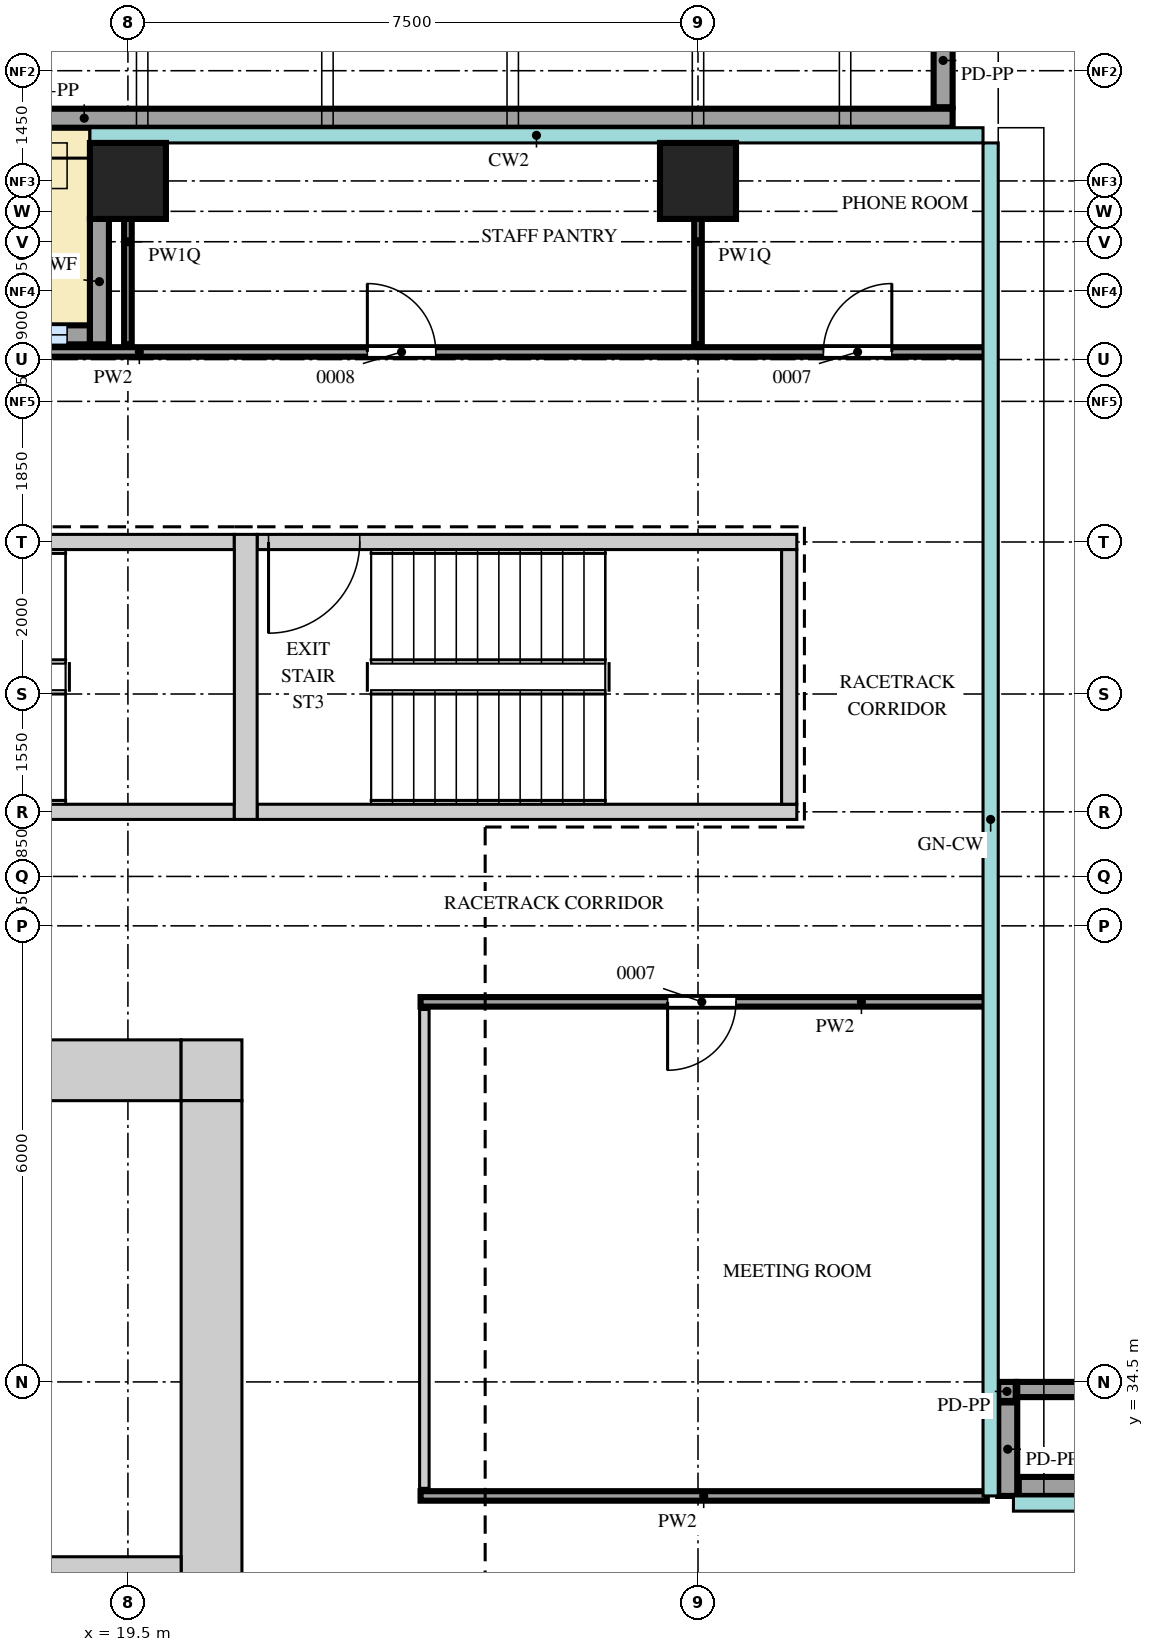
"""IFC4 building model, lengths in metres.
Left out: names, types, materials, properties, quantities, classifications, styles, units other than length and angle.
Written with IfcOpenShell. Run it as: python <this file> out.ifc"""

import sys

from ifc_helpers import new_model, si_unit, direction, frame, frame_2d, origin, origin_2d, place, context, subcontext, project, spatial, rectangle, extrude, source, transform, mapped, element, fill, save


model = new_model("IFC4")
c1 = context("Model", 3, precision=1e-05, world=origin(), true_north=direction((0.0, 1.0)))
c2 = subcontext(c1, "Body", "Model", "MODEL_VIEW")
j1 = project(units=[si_unit("LENGTHUNIT", "METRE"), si_unit("PLANEANGLEUNIT", "RADIAN")], contexts=[c1])
p1 = place(None, origin())
s1 = spatial("IfcSite", under=j1, at=p1, CompositionType="ELEMENT")
p2 = place(p1, origin())
s2 = spatial("IfcBuilding", under=s1, at=p2, CompositionType="ELEMENT")
p3 = place(p2, frame((0.0, 0.0, 164.7)))
s3 = spatial("IfcBuildingStorey", under=s2, at=p3, CompositionType="ELEMENT", Elevation=164.7)
m1 = source(origin(), c2, "Body", "SweptSolid", [
    extrude(rectangle(XDim=13.4, YDim=0.8, at=frame_2d((6.7, 0.0))), origin(), (0.0, 0.0, 1.0), 3.75),
])
p4 = place(p3, frame((6.8, 38.6, 0.0), z_axis=(0.0, 0.0, 1.0), x_axis=(1.0, 0.0, 0.0)))
e1 = element("IfcWall", 1, at=p4, inside=s3, PredefinedType="SHEAR", context=c2, shape_type="MappedRepresentation", body=[
    mapped(m1, transform((0.0, 0.0, 0.0))),
])
m2 = source(origin(), c2, "Body", "SweptSolid", [
    extrude(rectangle(XDim=0.9, YDim=2.1, at=frame_2d((0.45, 1.05))), frame((0.0, 0.41, 0.0), z_axis=(0.0, -1.0, 0.0), x_axis=(1.0, 0.0, 0.0)), (0.0, 0.0, 1.0), 0.82),
])
p5 = place(p4, frame((2.9, 0.0, 0.0)))
e2 = element("IfcOpeningElement", 2, at=p5, cuts=e1, PredefinedType="OPENING", context=c2, shape_type="MappedRepresentation", body=[
    mapped(m2, transform((0.0, 0.0, 0.0))),
])
p6 = place(p4, frame((9.6, 0.0, 0.0)))
e3 = element("IfcOpeningElement", 3, at=p6, cuts=e1, PredefinedType="OPENING", context=c2, shape_type="MappedRepresentation", body=[
    mapped(m2, transform((0.0, 0.0, 0.0))),
])
m3 = source(origin(), c2, "Body", "SweptSolid", [
    extrude(rectangle(XDim=0.8, YDim=0.8, at=frame_2d((0.4, 0.0))), origin(), (0.0, 0.0, 1.0), 3.75),
])
p7 = place(p3, frame((20.2, 38.6, 0.0), z_axis=(0.0, 0.0, 1.0), x_axis=(1.0, 0.0, 0.0)))
e4 = element("IfcWall", 4, at=p7, inside=s3, PredefinedType="SHEAR", context=c2, shape_type="MappedRepresentation", body=[
    mapped(m3, transform((0.0, 0.0, 0.0))),
])
m4 = source(origin(), c2, "Body", "SweptSolid", [
    extrude(rectangle(XDim=22.4, YDim=0.8, at=frame_2d((11.2, 0.0))), origin(), (0.0, 0.0, 1.0), 3.75),
])
p8 = place(p3, frame((20.6, 15.8, 0.0), z_axis=(0.0, 0.0, 1.0), x_axis=(0.0, 1.0, 0.0)))
e5 = element("IfcWall", 5, at=p8, inside=s3, PredefinedType="SHEAR", context=c2, shape_type="MappedRepresentation", body=[
    mapped(m4, transform((0.0, 0.0, 0.0))),
])
m5 = source(origin(), c2, "Body", "SweptSolid", [
    extrude(rectangle(XDim=1.8, YDim=2.1, at=frame_2d((0.9, 1.05))), frame((0.0, 0.41, 0.0), z_axis=(0.0, -1.0, 0.0), x_axis=(1.0, 0.0, 0.0)), (0.0, 0.0, 1.0), 0.82),
])
p9 = place(p8, frame((10.7, 0.0, 0.0)))
e6 = element("IfcOpeningElement", 6, at=p9, cuts=e5, PredefinedType="OPENING", context=c2, shape_type="MappedRepresentation", body=[
    mapped(m5, transform((0.0, 0.0, 0.0))),
])
p10 = place(p8, frame((0.35, 0.0, 0.0)))
e7 = element("IfcOpeningElement", 7, at=p10, cuts=e5, PredefinedType="OPENING", context=c2, shape_type="MappedRepresentation", body=[
    mapped(m2, transform((0.0, 0.0, 0.0))),
])
p11 = place(p8, frame((2.8, 0.0, 0.0)))
e8 = element("IfcOpeningElement", 8, at=p11, cuts=e5, PredefinedType="OPENING", context=c2, shape_type="MappedRepresentation", body=[
    mapped(m2, transform((0.0, 0.0, 0.0))),
])
p12 = place(p8, frame((5.55, 0.0, 0.0)))
e9 = element("IfcOpeningElement", 9, at=p12, cuts=e5, PredefinedType="OPENING", context=c2, shape_type="MappedRepresentation", body=[
    mapped(m2, transform((0.0, 0.0, 0.0))),
])
m6 = source(origin(), c2, "Body", "SweptSolid", [
    extrude(rectangle(XDim=7.0, YDim=0.2, at=frame_2d((3.5, 0.0))), origin(), (0.0, 0.0, 1.0), 3.75),
])
p13 = place(p3, frame((13.9, 45.55, 0.0), z_axis=(0.0, 0.0, 1.0), x_axis=(1.0, 0.0, 0.0)))
e10 = element("IfcWall", 10, at=p13, inside=s3, PredefinedType="SHEAR", context=c2, shape_type="MappedRepresentation", body=[
    mapped(m6, transform((0.0, 0.0, 0.0))),
])
m7 = source(origin(), c2, "Body", "SweptSolid", [
    extrude(rectangle(XDim=1.2, YDim=2.1, at=frame_2d((0.6, 1.05))), frame((0.0, 0.11, 0.0), z_axis=(0.0, -1.0, 0.0), x_axis=(1.0, 0.0, 0.0)), (0.0, 0.0, 1.0), 0.22),
])
p14 = place(p13, frame((0.35, 0.0, 0.0)))
e11 = element("IfcOpeningElement", 11, at=p14, cuts=e10, PredefinedType="OPENING", context=c2, shape_type="MappedRepresentation", body=[
    mapped(m7, transform((0.0, 0.0, 0.0))),
])
p15 = place(p3, frame((13.9, 42.0, 0.0), z_axis=(0.0, 0.0, 1.0), x_axis=(1.0, 0.0, 0.0)))
e12 = element("IfcWall", 12, at=p15, inside=s3, PredefinedType="SHEAR", context=c2, shape_type="MappedRepresentation", body=[
    mapped(m6, transform((0.0, 0.0, 0.0))),
])
m8 = source(origin(), c2, "Body", "SweptSolid", [
    extrude(rectangle(XDim=7.1, YDim=0.2, at=frame_2d((3.55, 0.0))), origin(), (0.0, 0.0, 1.0), 3.75),
])
p16 = place(p3, frame((21.2, 45.55, 0.0), z_axis=(0.0, 0.0, 1.0), x_axis=(1.0, 0.0, 0.0)))
e13 = element("IfcWall", 13, at=p16, inside=s3, PredefinedType="SHEAR", context=c2, shape_type="MappedRepresentation", body=[
    mapped(m8, transform((0.0, 0.0, 0.0))),
])
p17 = place(p16, frame((0.15, 0.0, 0.0)))
e14 = element("IfcOpeningElement", 14, at=p17, cuts=e13, PredefinedType="OPENING", context=c2, shape_type="MappedRepresentation", body=[
    mapped(m7, transform((0.0, 0.0, 0.0))),
])
p18 = place(p3, frame((21.2, 42.0, 0.0), z_axis=(0.0, 0.0, 1.0), x_axis=(1.0, 0.0, 0.0)))
e15 = element("IfcWall", 15, at=p18, inside=s3, PredefinedType="SHEAR", context=c2, shape_type="MappedRepresentation", body=[
    mapped(m8, transform((0.0, 0.0, 0.0))),
])
m9 = source(origin(), c2, "Body", "SweptSolid", [
    extrude(rectangle(XDim=3.75, YDim=0.3, at=frame_2d((1.875, 0.0))), origin(), (0.0, 0.0, 1.0), 3.75),
])
p19 = place(p3, frame((21.05, 41.9, 0.0), z_axis=(0.0, 0.0, 1.0), x_axis=(0.0, 1.0, 0.0)))
e16 = element("IfcWall", 16, at=p19, inside=s3, PredefinedType="SHEAR", context=c2, shape_type="MappedRepresentation", body=[
    mapped(m9, transform((0.0, 0.0, 0.0))),
])
m10 = source(origin(), c2, "Body", "SweptSolid", [
    extrude(rectangle(XDim=3.35, YDim=0.2, at=frame_2d((1.675, 0.0))), origin(), (0.0, 0.0, 1.0), 3.75),
])
p20 = place(p3, frame((28.2, 42.1, 0.0), z_axis=(0.0, 0.0, 1.0), x_axis=(0.0, 1.0, 0.0)))
e17 = element("IfcWall", 17, at=p20, inside=s3, PredefinedType="SHEAR", context=c2, shape_type="MappedRepresentation", body=[
    mapped(m10, transform((0.0, 0.0, 0.0))),
])
m11 = source(origin(), c2, "Body", "SweptSolid", [
    extrude(rectangle(XDim=13.4, YDim=0.3, at=frame_2d((6.7, 0.0))), origin(), (0.0, 0.0, 1.0), 3.75),
])
p21 = place(p3, frame((6.8, 32.05, 0.0), z_axis=(0.0, 0.0, 1.0), x_axis=(1.0, 0.0, 0.0)))
e18 = element("IfcWall", 18, at=p21, inside=s3, PredefinedType="STANDARD", context=c2, shape_type="MappedRepresentation", body=[
    mapped(m11, transform((0.0, 0.0, 0.0))),
])
m12 = source(origin(), c2, "Body", "SweptSolid", [
    extrude(rectangle(XDim=1.0, YDim=1.0, at=origin_2d()), origin(), (0.0, 0.0, 1.0), 3.75),
])
for number, where, z_axis, x_axis in (
    (19, (19.5, 50.3, 0.0), (0.0, 0.0, 1.0), (1.0, 0.0, 0.0)),
    (20, (27.0, 50.3, 0.0), (0.0, 0.0, 1.0), (1.0, 0.0, 0.0)),
):
    element("IfcColumn", number, at=place(p3, frame(where, z_axis=z_axis, x_axis=x_axis)), inside=s3, PredefinedType="COLUMN", context=c2, shape_type="MappedRepresentation", body=[
        mapped(m12, transform((0.0, 0.0, 0.0))),
    ])
m13 = source(origin(), c2, "Body", "SweptSolid", [
    extrude(rectangle(XDim=6.5, YDim=0.25, at=frame_2d((3.25, 0.0))), origin(), (0.0, 0.0, 1.0), 3.75),
])
p22 = place(p3, frame((12.5, 48.275, 0.0), z_axis=(0.0, 0.0, 1.0), x_axis=(1.0, 0.0, 0.0)))
e21 = element("IfcWall", 21, at=p22, inside=s3, PredefinedType="SOLIDWALL", context=c2, shape_type="MappedRepresentation", body=[
    mapped(m13, transform((0.0, 0.0, 0.0))),
])
m14 = source(origin(), c2, "Body", "SweptSolid", [
    extrude(rectangle(XDim=1.75, YDim=2.4, at=frame_2d((0.875, 1.2))), frame((0.0, 0.135, 0.0), z_axis=(0.0, -1.0, 0.0), x_axis=(1.0, 0.0, 0.0)), (0.0, 0.0, 1.0), 0.27),
])
p23 = place(p22, frame((0.3, 0.0, 0.0)))
e22 = element("IfcOpeningElement", 22, at=p23, cuts=e21, PredefinedType="OPENING", context=c2, shape_type="MappedRepresentation", body=[
    mapped(m14, transform((0.0, 0.0, 0.0))),
])
p24 = place(p22, frame((4.45, 0.0, 0.0)))
e23 = element("IfcOpeningElement", 23, at=p24, cuts=e21, PredefinedType="OPENING", context=c2, shape_type="MappedRepresentation", body=[
    mapped(m14, transform((0.0, 0.0, 0.0))),
])
m15 = source(origin(), c2, "Body", "SweptSolid", [
    extrude(rectangle(XDim=1.8, YDim=2.4, at=frame_2d((0.9, 1.2))), frame((0.0, 0.135, 0.0), z_axis=(0.0, -1.0, 0.0), x_axis=(1.0, 0.0, 0.0)), (0.0, 0.0, 1.0), 0.27),
])
p25 = place(p22, frame((2.35, 0.0, 0.0)))
e24 = element("IfcOpeningElement", 24, at=p25, cuts=e21, PredefinedType="OPENING", context=c2, shape_type="MappedRepresentation", body=[
    mapped(m15, transform((0.0, 0.0, 0.0))),
])
m16 = source(origin(), c2, "Body", "SweptSolid", [
    extrude(rectangle(XDim=1.65, YDim=0.25, at=frame_2d((0.825, 0.0))), origin(), (0.0, 0.0, 1.0), 3.45),
])
p26 = place(p3, frame((19.125, 49.8, 0.0), z_axis=(0.0, 0.0, 1.0), x_axis=(0.0, -1.0, 0.0)))
e25 = element("IfcWall", 25, at=p26, inside=s3, PredefinedType="SOLIDWALL", context=c2, shape_type="MappedRepresentation", body=[
    mapped(m16, transform((0.0, 0.0, 0.0))),
])
m17 = source(origin(), c2, "Body", "SweptSolid", [
    extrude(rectangle(XDim=12.6, YDim=0.2, at=frame_2d((6.3, 0.0))), origin(), (0.0, 0.0, 1.0), 1.1),
])
p27 = place(p3, frame((31.2, 34.4, 0.0), z_axis=(0.0, 0.0, 1.0), x_axis=(1.0, 0.0, 0.0)))
e26 = element("IfcWall", 26, at=p27, inside=s3, PredefinedType="SOLIDWALL", context=c2, shape_type="MappedRepresentation", body=[
    mapped(m17, transform((0.0, 0.0, 0.0))),
])
m18 = source(origin(), c2, "Body", "SweptSolid", [
    extrude(rectangle(XDim=0.23, YDim=0.25, at=frame_2d((0.115, 0.0))), origin(), (0.0, 0.0, 1.0), 1.1),
])
p28 = place(p3, frame((31.18, 34.375, 0.0), z_axis=(0.0, 0.0, 1.0), x_axis=(-1.0, 0.0, 0.0)))
e27 = element("IfcWall", 27, at=p28, inside=s3, PredefinedType="SOLIDWALL", context=c2, shape_type="MappedRepresentation", body=[
    mapped(m18, transform((0.0, 0.0, 0.0))),
])
m19 = source(origin(), c2, "Body", "SweptSolid", [
    extrude(rectangle(XDim=1.23, YDim=0.25, at=frame_2d((0.615, 0.0))), origin(), (0.0, 0.0, 1.0), 1.1),
])
p29 = place(p3, frame((31.075, 34.23, 0.0), z_axis=(0.0, 0.0, 1.0), x_axis=(0.0, -1.0, 0.0)))
e28 = element("IfcWall", 28, at=p29, inside=s3, PredefinedType="SOLIDWALL", context=c2, shape_type="MappedRepresentation", body=[
    mapped(m19, transform((0.0, 0.0, 0.0))),
])
m20 = source(origin(), c2, "Body", "SweptSolid", [
    extrude(rectangle(XDim=12.83, YDim=0.25, at=frame_2d((6.415, 0.0))), origin(), (0.0, 0.0, 1.0), 1.1),
])
p30 = place(p3, frame((31.22, 33.125, 0.0), z_axis=(0.0, 0.0, 1.0), x_axis=(1.0, 0.0, 0.0)))
e29 = element("IfcWall", 29, at=p30, inside=s3, PredefinedType="SOLIDWALL", context=c2, shape_type="MappedRepresentation", body=[
    mapped(m20, transform((0.0, 0.0, 0.0))),
])
m21 = source(origin(), c2, "Body", "SweptSolid", [
    extrude(rectangle(XDim=22.85, YDim=0.25, at=frame_2d((11.425, 0.0))), origin(), (0.0, 0.0, 1.0), 1.1),
])
p31 = place(p3, frame((7.5, 51.125, 0.0), z_axis=(0.0, 0.0, 1.0), x_axis=(1.0, 0.0, 0.0)))
e30 = element("IfcWall", 30, at=p31, inside=s3, PredefinedType="SOLIDWALL", context=c2, shape_type="MappedRepresentation", body=[
    mapped(m21, transform((0.0, 0.0, 0.0))),
])
p32 = place(p3, frame((30.225, 51.27, 0.0), z_axis=(0.0, 0.0, 1.0), x_axis=(0.0, 1.0, 0.0)))
e31 = element("IfcWall", 31, at=p32, inside=s3, PredefinedType="SOLIDWALL", context=c2, shape_type="MappedRepresentation", body=[
    mapped(m19, transform((0.0, 0.0, 0.0))),
])
m22 = source(origin(), c2, "Body", "SweptSolid", [
    extrude(rectangle(XDim=7.45, YDim=0.125, at=frame_2d((3.725, 0.0))), origin(), (0.0, 0.0, 1.0), 3.8),
])
p33 = place(p3, frame((23.35, 33.0, 0.0), z_axis=(0.0, 0.0, 1.0), x_axis=(1.0, 0.0, 0.0)))
e32 = element("IfcWall", 32, at=p33, inside=s3, PredefinedType="PARTITIONING", context=c2, shape_type="MappedRepresentation", body=[
    mapped(m22, transform((0.0, 0.0, 0.0))),
])
m23 = source(origin(), c2, "Body", "SweptSolid", [
    extrude(rectangle(XDim=6.3, YDim=0.125, at=frame_2d((3.15, 0.0))), origin(), (0.0, 0.0, 1.0), 3.8),
])
p34 = place(p3, frame((23.4, 33.1, 0.0), z_axis=(0.0, 0.0, 1.0), x_axis=(0.0, 1.0, 0.0)))
e33 = element("IfcWall", 33, at=p34, inside=s3, PredefinedType="PARTITIONING", context=c2, shape_type="MappedRepresentation", body=[
    mapped(m23, transform((0.0, 0.0, 0.0))),
])
p35 = place(p3, frame((23.35, 39.5, 0.0), z_axis=(0.0, 0.0, 1.0), x_axis=(1.0, 0.0, 0.0)))
e34 = element("IfcWall", 34, at=p35, inside=s3, PredefinedType="PARTITIONING", context=c2, shape_type="MappedRepresentation", body=[
    mapped(m22, transform((0.0, 0.0, 0.0))),
])
m24 = source(origin(), c2, "Body", "SweptSolid", [
    extrude(rectangle(XDim=0.9, YDim=2.1, at=frame_2d((0.45, 1.05))), frame((0.0, 0.073, 0.0), z_axis=(0.0, -1.0, 0.0), x_axis=(1.0, 0.0, 0.0)), (0.0, 0.0, 1.0), 0.145),
])
p36 = place(p35, frame((3.25, 0.0, 0.0)))
e35 = element("IfcOpeningElement", 35, at=p36, cuts=e34, PredefinedType="OPENING", context=c2, shape_type="MappedRepresentation", body=[
    mapped(m24, transform((0.0, 0.0, 0.0))),
])
m25 = source(origin(), c2, "Body", "SweptSolid", [
    extrude(rectangle(XDim=23.15, YDim=0.125, at=frame_2d((11.575, 0.0))), origin(), (0.0, 0.0, 1.0), 3.8),
])
p37 = place(p3, frame((7.65, 48.05, 0.0), z_axis=(0.0, 0.0, 1.0), x_axis=(1.0, 0.0, 0.0)))
e36 = element("IfcWall", 36, at=p37, inside=s3, PredefinedType="PARTITIONING", context=c2, shape_type="MappedRepresentation", body=[
    mapped(m25, transform((0.0, 0.0, 0.0))),
])
p38 = place(p37, frame((1.5, 0.0, 0.0)))
e37 = element("IfcOpeningElement", 37, at=p38, cuts=e36, PredefinedType="OPENING", context=c2, shape_type="MappedRepresentation", body=[
    mapped(m24, transform((0.0, 0.0, 0.0))),
])
m26 = source(origin(), c2, "Body", "SweptSolid", [
    extrude(rectangle(XDim=1.8, YDim=2.1, at=frame_2d((0.9, 1.05))), frame((0.0, 0.073, 0.0), z_axis=(0.0, -1.0, 0.0), x_axis=(1.0, 0.0, 0.0)), (0.0, 0.0, 1.0), 0.145),
])
p39 = place(p37, frame((7.2, 0.0, 0.0)))
e38 = element("IfcOpeningElement", 38, at=p39, cuts=e36, PredefinedType="OPENING", context=c2, shape_type="MappedRepresentation", body=[
    mapped(m26, transform((0.0, 0.0, 0.0))),
])
p40 = place(p37, frame((15.0, 0.0, 0.0)))
e39 = element("IfcOpeningElement", 39, at=p40, cuts=e36, PredefinedType="OPENING", context=c2, shape_type="MappedRepresentation", body=[
    mapped(m24, transform((0.0, 0.0, 0.0))),
])
p41 = place(p37, frame((21.0, 0.0, 0.0)))
e40 = element("IfcOpeningElement", 40, at=p41, cuts=e36, PredefinedType="OPENING", context=c2, shape_type="MappedRepresentation", body=[
    mapped(m24, transform((0.0, 0.0, 0.0))),
])
m27 = source(origin(), c2, "Body", "SweptSolid", [
    extrude(rectangle(XDim=2.7, YDim=0.1, at=frame_2d((1.35, 0.0))), origin(), (0.0, 0.0, 1.0), 3.42),
])
for number, where, z_axis, x_axis in (
    (41, (19.5, 48.15, 0.0), (0.0, 0.0, 1.0), (0.0, 1.0, 0.0)),
    (42, (27.0, 48.15, 0.0), (0.0, 0.0, 1.0), (0.0, 1.0, 0.0)),
):
    element("IfcWall", number, at=place(p3, frame(where, z_axis=z_axis, x_axis=x_axis)), inside=s3, PredefinedType="PARTITIONING", context=c2, shape_type="MappedRepresentation", body=[
        mapped(m27, transform((0.0, 0.0, 0.0))),
    ])
m28 = source(origin(), c2, "Body", "SweptSolid", [
    extrude(rectangle(XDim=1.75, YDim=2.4, at=frame_2d((0.875, 1.2))), frame((0.0, 0.03, 0.0), z_axis=(0.0, -1.0, 0.0), x_axis=(1.0, 0.0, 0.0)), (0.0, 0.0, 1.0), 0.06),
])
p42 = place(p24, origin())
e43 = element("IfcWindow", 43, at=p42, inside=s3, PartitioningType="SINGLE_PANEL", PredefinedType="WINDOW", context=c2, shape_type="MappedRepresentation", body=[
    mapped(m28, transform((0.0, 0.0, 0.0))),
])
fill(e23, e43)
m29 = source(origin(), c2, "Body", "SweptSolid", [
    extrude(rectangle(XDim=0.9, YDim=2.1, at=frame_2d((0.45, 1.05))), frame((0.0, 0.025, 0.0), z_axis=(0.0, -1.0, 0.0), x_axis=(1.0, 0.0, 0.0)), (0.0, 0.0, 1.0), 0.05),
])
p43 = place(p36, origin())
e44 = element("IfcDoor", 44, at=p43, inside=s3, OperationType="SINGLE_SWING_LEFT", PredefinedType="DOOR", context=c2, shape_type="MappedRepresentation", body=[
    mapped(m29, transform((0.0, 0.0, 0.0))),
])
fill(e35, e44)
p44 = place(p40, origin())
e45 = element("IfcDoor", 45, at=p44, inside=s3, OperationType="SINGLE_SWING_RIGHT", PredefinedType="DOOR", context=c2, shape_type="MappedRepresentation", body=[
    mapped(m29, transform((0.0, 0.0, 0.0))),
])
fill(e39, e45)
p45 = place(p41, origin())
e46 = element("IfcDoor", 46, at=p45, inside=s3, OperationType="SINGLE_SWING_LEFT", PredefinedType="DOOR", context=c2, shape_type="MappedRepresentation", body=[
    mapped(m29, transform((0.0, 0.0, 0.0))),
])
fill(e40, e46)
m30 = source(origin(), c2, "Body", "SweptSolid", [
    extrude(rectangle(XDim=1.2, YDim=2.1, at=frame_2d((0.6, 1.05))), frame((0.0, 0.025, 0.0), z_axis=(0.0, -1.0, 0.0), x_axis=(1.0, 0.0, 0.0)), (0.0, 0.0, 1.0), 0.05),
])
p46 = place(p17, origin())
e47 = element("IfcDoor", 47, at=p46, inside=s3, OperationType="SINGLE_SWING_LEFT", PredefinedType="DOOR", context=c2, shape_type="MappedRepresentation", body=[
    mapped(m30, transform((0.0, 0.0, 0.0))),
])
fill(e14, e47)
save(model, sys.argv[1])
